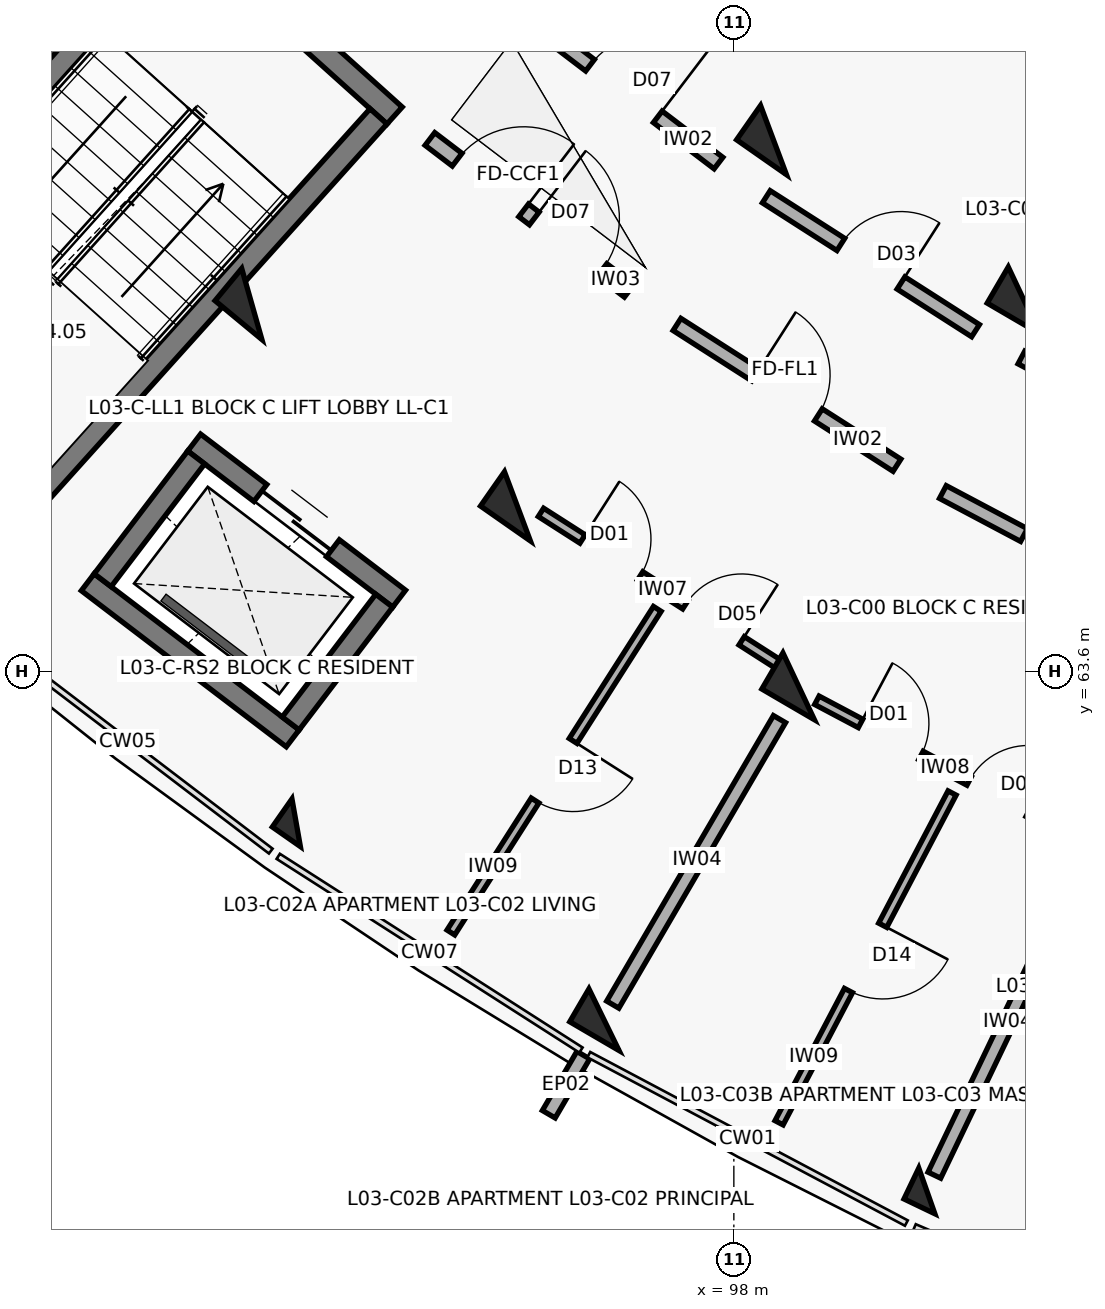
"""IFC4 building model, lengths in metres.
Left out: names, types, materials, properties, quantities, classifications, styles, units other than length and angle.
Written with IfcOpenShell. Run it as: python <this file> out.ifc"""

import sys

from ifc_helpers import new_model, si_unit, direction, frame, frame_2d, origin, origin_2d, place, context, subcontext, project, spatial, rectangle, extrude, element, fill, save


model = new_model("IFC4")
c1 = context("Model", 3, precision=1e-05, world=origin(), true_north=direction((0.0, 1.0)))
c2 = subcontext(c1, "Body", "Model", "MODEL_VIEW")
j1 = project(units=[si_unit("LENGTHUNIT", "METRE"), si_unit("PLANEANGLEUNIT", "RADIAN")], contexts=[c1])
p1 = place(None, origin())
s1 = spatial("IfcSite", under=j1, at=p1, CompositionType="ELEMENT")
p2 = place(p1, origin())
s2 = spatial("IfcBuilding", under=s1, at=p2, CompositionType="ELEMENT")
p3 = place(p2, frame((0.0, 0.0, 11.2)))
s3 = spatial("IfcBuildingStorey", under=s2, at=p3, CompositionType="ELEMENT", Elevation=11.2)
for number, where, z_axis, x_axis in (
    (1, (91.658, 68.43, 0.0), (0.0, 0.0, 1.0), (-0.638, -0.77, 0.0)),
    (2, (98.522, 70.587, 0.0), (0.0, 0.0, 1.0), (-0.573, -0.82, 0.0)),
    (3, (95.152, 65.768, 0.0), (0.0, 0.0, 1.0), (-0.573, -0.82, 0.0)),
):
    element("IfcColumn", number, at=place(p3, frame(where, z_axis=z_axis, x_axis=x_axis)), inside=s3, PredefinedType="COLUMN", context=c2, shape_type="SweptSolid", body=[
        extrude(rectangle(XDim=0.55, YDim=0.8, at=origin_2d()), origin(), (0.0, 0.0, 1.0), 3.1),
    ])
p4 = place(p3, frame((92.241, 61.605, 0.0), z_axis=(0.0, 0.0, 1.0), x_axis=(-0.573004420611, -0.819552276527, 0.0)))
e4 = element("IfcColumn", 4, at=p4, inside=s3, PredefinedType="COLUMN", context=c2, shape_type="SweptSolid", body=[
    extrude(rectangle(XDim=0.45, YDim=0.45, at=origin_2d()), origin(), (0.0, 0.0, 1.0), 3.1),
])
for number, where, z_axis, x_axis in (
    (5, (101.817, 68.478, 0.0), (0.0, 0.0, 1.0), (-0.504, -0.864, 0.0)),
    (6, (98.853, 63.4, 0.0), (0.0, 0.0, 1.0), (-0.504, -0.864, 0.0)),
):
    element("IfcColumn", number, at=place(p3, frame(where, z_axis=z_axis, x_axis=x_axis)), inside=s3, PredefinedType="COLUMN", context=c2, shape_type="SweptSolid", body=[
        extrude(rectangle(XDim=0.55, YDim=0.8, at=origin_2d()), origin(), (0.0, 0.0, 1.0), 3.1),
    ])
p5 = place(p3, frame((96.291, 59.013, 0.0), z_axis=(0.0, 0.0, 1.0), x_axis=(-0.504226211181, -0.863571611366, 0.0)))
e7 = element("IfcColumn", 7, at=p5, inside=s3, PredefinedType="COLUMN", context=c2, shape_type="SweptSolid", body=[
    extrude(rectangle(XDim=0.5, YDim=0.75, at=origin_2d()), origin(), (0.0, 0.0, 1.0), 3.1),
])
p6 = place(p3, frame((100.539, 56.76, 0.0), z_axis=(0.0, 0.0, 1.0), x_axis=(-0.432085748802, -0.901832526405, 0.0)))
e8 = element("IfcColumn", 8, at=p6, inside=s3, PredefinedType="COLUMN", context=c2, shape_type="SweptSolid", body=[
    extrude(rectangle(XDim=0.45, YDim=0.45, at=origin_2d()), origin(), (0.0, 0.0, 1.0), 3.1),
])
p7 = place(p3, frame((96.019, 58.547, 0.0), z_axis=(0.0, 0.0, 1.0), x_axis=(-0.504005947934, -0.863700182035, 0.0)))
e9 = element("IfcWall", 9, at=p7, inside=s3, PredefinedType="PARAPET", context=c2, shape_type="SweptSolid", body=[
    extrude(rectangle(XDim=0.9, YDim=0.195, at=frame_2d((0.45, 0.0))), origin(), (0.0, 0.0, 1.0), 2.25),
])
p8 = place(p3, frame((90.66, 73.499, 0.0), z_axis=(0.0, 0.0, 1.0), x_axis=(0.743375696158, -0.668874109501, 0.0)))
e10 = element("IfcWall", 10, at=p8, inside=s3, PredefinedType="SHEAR", context=c2, shape_type="SweptSolid", body=[
    extrude(rectangle(XDim=3.87, YDim=0.3, at=frame_2d((1.935, 0.0))), origin(), (0.0, 0.0, 1.0), 3.1),
])
p9 = place(p8, frame((1.435, 0.0, 0.0)))
e11 = element("IfcOpeningElement", 11, at=p9, cuts=e10, PredefinedType="OPENING", context=c2, shape_type="SweptSolid", body=[
    extrude(rectangle(XDim=1.0, YDim=2.15, at=frame_2d((0.5, 1.075))), frame((0.0, 0.16, 0.0), z_axis=(0.0, -1.0, 0.0), x_axis=(1.0, 0.0, 0.0)), (0.0, 0.0, 1.0), 0.32),
])
p10 = place(p3, frame((90.671, 73.287, 0.0), z_axis=(0.0, 0.0, 1.0), x_axis=(-0.668885797871, -0.743365179038, 0.0)))
e12 = element("IfcWall", 12, at=p10, inside=s3, PredefinedType="SHEAR", context=c2, shape_type="SweptSolid", body=[
    extrude(rectangle(XDim=7.69, YDim=0.3, at=frame_2d((3.845, 0.0))), origin(), (0.0, 0.0, 1.0), 3.1),
])
p11 = place(p3, frame((93.325, 70.899, 0.0), z_axis=(0.0, 0.0, 1.0), x_axis=(-0.668868253964, -0.743380964808, 0.0)))
e13 = element("IfcWall", 13, at=p11, inside=s3, PredefinedType="SHEAR", context=c2, shape_type="SweptSolid", body=[
    extrude(rectangle(XDim=7.69, YDim=0.3, at=frame_2d((3.845, 0.0))), origin(), (0.0, 0.0, 1.0), 3.1),
])
p12 = place(p3, frame((90.899, 66.607, 0.0), z_axis=(0.0, 0.0, 1.0), x_axis=(0.795439986025, -0.606032365994, 0.0)))
e14 = element("IfcWall", 14, at=p12, inside=s3, PredefinedType="SHEAR", context=c2, shape_type="SweptSolid", body=[
    extrude(rectangle(XDim=3.39, YDim=0.28, at=frame_2d((1.695, 0.0))), origin(), (0.0, 0.0, 1.0), 3.1),
])
p13 = place(p12, frame((1.095, 0.0, 0.0)))
e15 = element("IfcOpeningElement", 15, at=p13, cuts=e14, PredefinedType="OPENING", context=c2, shape_type="SweptSolid", body=[
    extrude(rectangle(XDim=1.2, YDim=2.15, at=frame_2d((0.6, 1.075))), frame((0.0, 0.15, 0.0), z_axis=(0.0, -1.0, 0.0), x_axis=(1.0, 0.0, 0.0)), (0.0, 0.0, 1.0), 0.3),
])
p14 = place(p3, frame((89.5, 64.77, 0.0), z_axis=(0.0, 0.0, 1.0), x_axis=(0.795474703455, -0.605986795371, 0.0)))
e16 = element("IfcWall", 16, at=p14, inside=s3, PredefinedType="SHEAR", context=c2, shape_type="SweptSolid", body=[
    extrude(rectangle(XDim=3.39, YDim=0.28, at=frame_2d((1.695, 0.0))), origin(), (0.0, 0.0, 1.0), 3.1),
])
p15 = place(p3, frame((90.926, 66.411, 0.0), z_axis=(0.0, 0.0, 1.0), x_axis=(-0.605948992168, -0.795503500238, 0.0)))
e17 = element("IfcWall", 17, at=p15, inside=s3, PredefinedType="SHEAR", context=c2, shape_type="SweptSolid", body=[
    extrude(rectangle(XDim=2.03, YDim=0.28, at=frame_2d((1.015, 0.0))), origin(), (0.0, 0.0, 1.0), 3.1),
])
p16 = place(p3, frame((93.4, 64.526, 0.0), z_axis=(0.0, 0.0, 1.0), x_axis=(-0.605891019062, -0.795547656033, 0.0)))
e18 = element("IfcWall", 18, at=p16, inside=s3, PredefinedType="SHEAR", context=c2, shape_type="SweptSolid", body=[
    extrude(rectangle(XDim=2.03, YDim=0.28, at=frame_2d((1.015, 0.0))), origin(), (0.0, 0.0, 1.0), 3.1),
])
p17 = place(p3, frame((94.001, 70.602, 0.0), z_axis=(0.0, 0.0, 1.0), x_axis=(0.795498026433, -0.605956178235, 0.0)))
e19 = element("IfcWall", 19, at=p17, inside=s3, PredefinedType="SOLIDWALL", context=c2, shape_type="SweptSolid", body=[
    extrude(rectangle(XDim=3.296, YDim=0.21, at=frame_2d((1.648, 0.0))), origin(), (0.0, 0.0, 1.0), 2.08),
])
p18 = place(p17, frame((0.45, 0.0, 0.0)))
e20 = element("IfcOpeningElement", 20, at=p18, cuts=e19, PredefinedType="OPENING", context=c2, shape_type="SweptSolid", body=[
    extrude(rectangle(XDim=1.1, YDim=2.15, at=frame_2d((0.55, 1.075))), frame((0.0, 0.115, 0.0), z_axis=(0.0, -1.0, 0.0), x_axis=(1.0, 0.0, 0.0)), (0.0, 0.0, 1.0), 0.23),
])
p19 = place(p17, frame((1.726, 0.0, 0.0)))
e21 = element("IfcOpeningElement", 21, at=p19, cuts=e19, PredefinedType="OPENING", context=c2, shape_type="SweptSolid", body=[
    extrude(rectangle(XDim=1.12, YDim=2.15, at=frame_2d((0.56, 1.075))), frame((0.0, 0.115, 0.0), z_axis=(0.0, -1.0, 0.0), x_axis=(1.0, 0.0, 0.0)), (0.0, 0.0, 1.0), 0.23),
])
p20 = place(p3, frame((95.309, 72.18, 0.0), z_axis=(0.0, 0.0, 1.0), x_axis=(0.795463961918, -0.606000895453, 0.0)))
e22 = element("IfcWall", 22, at=p20, inside=s3, PredefinedType="SOLIDWALL", context=c2, shape_type="SweptSolid", body=[
    extrude(rectangle(XDim=3.129, YDim=0.19, at=frame_2d((1.564, 0.0))), origin(), (0.0, 0.0, 1.0), 2.08),
])
p21 = place(p20, frame((1.004, 0.0, 0.0)))
e23 = element("IfcOpeningElement", 23, at=p21, cuts=e22, PredefinedType="OPENING", context=c2, shape_type="SweptSolid", body=[
    extrude(rectangle(XDim=1.12, YDim=2.15, at=frame_2d((0.56, 1.075))), frame((0.0, 0.105, 0.0), z_axis=(0.0, -1.0, 0.0), x_axis=(1.0, 0.0, 0.0)), (0.0, 0.0, 1.0), 0.21),
])
p22 = place(p3, frame((97.252, 68.161, 0.0), z_axis=(0.0, 0.0, 1.0), x_axis=(0.842289466461, -0.53902546757, 0.0)))
e24 = element("IfcWall", 24, at=p22, inside=s3, PredefinedType="SOLIDWALL", context=c2, shape_type="SweptSolid", body=[
    extrude(rectangle(XDim=3.436, YDim=0.19, at=frame_2d((1.718, 0.0))), origin(), (0.0, 0.0, 1.0), 2.08),
])
p23 = place(p22, frame((1.228, 0.0, 0.0)))
e25 = element("IfcOpeningElement", 25, at=p23, cuts=e24, PredefinedType="OPENING", context=c2, shape_type="SweptSolid", body=[
    extrude(rectangle(XDim=0.98, YDim=2.15, at=frame_2d((0.49, 1.075))), frame((0.0, 0.105, 0.0), z_axis=(0.0, -1.0, 0.0), x_axis=(1.0, 0.0, 0.0)), (0.0, 0.0, 1.0), 0.21),
])
p24 = place(p3, frame((98.427, 69.841, 0.0), z_axis=(0.0, 0.0, 1.0), x_axis=(0.842280895761, -0.539038860043, 0.0)))
e26 = element("IfcWall", 26, at=p24, inside=s3, PredefinedType="SOLIDWALL", context=c2, shape_type="SweptSolid", body=[
    extrude(rectangle(XDim=3.269, YDim=0.19, at=frame_2d((1.634, 0.0))), origin(), (0.0, 0.0, 1.0), 2.08),
])
p25 = place(p24, frame((1.164, 0.0, 0.0)))
e27 = element("IfcOpeningElement", 27, at=p25, cuts=e26, PredefinedType="OPENING", context=c2, shape_type="SweptSolid", body=[
    extrude(rectangle(XDim=0.94, YDim=2.1, at=frame_2d((0.47, 1.05))), frame((0.0, 0.105, 0.0), z_axis=(0.0, -1.0, 0.0), x_axis=(1.0, 0.0, 0.0)), (0.0, 0.0, 1.0), 0.21),
])
p26 = place(p3, frame((95.462, 65.688, 0.0), z_axis=(0.0, 0.0, 1.0), x_axis=(0.842274914974, -0.539048205271, 0.0)))
e28 = element("IfcWall", 28, at=p26, inside=s3, PredefinedType="PARTITIONING", context=c2, shape_type="SweptSolid", body=[
    extrude(rectangle(XDim=3.785, YDim=0.13, at=frame_2d((1.893, 0.0))), origin(), (0.0, 0.0, 1.0), 2.08),
])
p27 = place(p26, frame((0.65, 0.0, 0.0)))
e29 = element("IfcOpeningElement", 29, at=p27, cuts=e28, PredefinedType="OPENING", context=c2, shape_type="SweptSolid", body=[
    extrude(rectangle(XDim=0.9, YDim=2.1, at=frame_2d((0.45, 1.05))), frame((0.0, 0.075, 0.0), z_axis=(0.0, -1.0, 0.0), x_axis=(1.0, 0.0, 0.0)), (0.0, 0.0, 1.0), 0.15),
])
p28 = place(p26, frame((2.255, 0.0, 0.0)))
e30 = element("IfcOpeningElement", 30, at=p28, cuts=e28, PredefinedType="OPENING", context=c2, shape_type="SweptSolid", body=[
    extrude(rectangle(XDim=0.88, YDim=2.1, at=frame_2d((0.44, 1.05))), frame((0.0, 0.075, 0.0), z_axis=(0.0, -1.0, 0.0), x_axis=(1.0, 0.0, 0.0)), (0.0, 0.0, 1.0), 0.15),
])
p29 = place(p3, frame((96.993, 64.418, 0.0), z_axis=(0.0, 0.0, 1.0), x_axis=(-0.537785480308, -0.843081714409, 0.0)))
e31 = element("IfcWall", 31, at=p29, inside=s3, PredefinedType="PARTITIONING", context=c2, shape_type="SweptSolid", body=[
    extrude(rectangle(XDim=5.05, YDim=0.12, at=frame_2d((2.525, 0.0))), origin(), (0.0, 0.0, 1.0), 2.08),
])
p30 = place(p29, frame((2.06, 0.0, 0.0)))
e32 = element("IfcOpeningElement", 32, at=p30, cuts=e31, PredefinedType="OPENING", context=c2, shape_type="SweptSolid", body=[
    extrude(rectangle(XDim=0.93, YDim=2.1, at=frame_2d((0.465, 1.05))), frame((0.0, 0.07, 0.0), z_axis=(0.0, -1.0, 0.0), x_axis=(1.0, 0.0, 0.0)), (0.0, 0.0, 1.0), 0.14),
])
p31 = place(p3, frame((100.75, 65.956, 0.0), z_axis=(0.0, 0.0, 1.0), x_axis=(0.883440266101, -0.468543803963, 0.0)))
e33 = element("IfcWall", 33, at=p31, inside=s3, PredefinedType="SOLIDWALL", context=c2, shape_type="SweptSolid", body=[
    extrude(rectangle(XDim=3.436, YDim=0.19, at=frame_2d((1.718, 0.0))), origin(), (0.0, 0.0, 1.0), 2.08),
])
p32 = place(p31, frame((1.208, 0.0, 0.0)))
e34 = element("IfcOpeningElement", 34, at=p32, cuts=e33, PredefinedType="OPENING", context=c2, shape_type="SweptSolid", body=[
    extrude(rectangle(XDim=1.02, YDim=2.15, at=frame_2d((0.51, 1.075))), frame((0.0, 0.105, 0.0), z_axis=(0.0, -1.0, 0.0), x_axis=(1.0, 0.0, 0.0)), (0.0, 0.0, 1.0), 0.21),
])
p33 = place(p3, frame((101.784, 67.726, 0.0), z_axis=(0.0, 0.0, 1.0), x_axis=(0.883444301944, -0.468536194293, 0.0)))
e35 = element("IfcWall", 35, at=p33, inside=s3, PredefinedType="SOLIDWALL", context=c2, shape_type="SweptSolid", body=[
    extrude(rectangle(XDim=3.269, YDim=0.19, at=frame_2d((1.634, 0.0))), origin(), (0.0, 0.0, 1.0), 2.08),
])
p34 = place(p33, frame((1.154, 0.0, 0.0)))
e36 = element("IfcOpeningElement", 36, at=p34, cuts=e35, PredefinedType="OPENING", context=c2, shape_type="SweptSolid", body=[
    extrude(rectangle(XDim=0.96, YDim=2.1, at=frame_2d((0.48, 1.05))), frame((0.0, 0.105, 0.0), z_axis=(0.0, -1.0, 0.0), x_axis=(1.0, 0.0, 0.0)), (0.0, 0.0, 1.0), 0.21),
])
p35 = place(p3, frame((99.093, 63.216, 0.0), z_axis=(0.0, 0.0, 1.0), x_axis=(0.883432667361, -0.468558131121, 0.0)))
e37 = element("IfcWall", 37, at=p35, inside=s3, PredefinedType="PARTITIONING", context=c2, shape_type="SweptSolid", body=[
    extrude(rectangle(XDim=3.797, YDim=0.125, at=frame_2d((1.899, 0.0))), origin(), (0.0, 0.0, 1.0), 2.08),
])
p36 = place(p35, frame((0.65, 0.0, 0.0)))
e38 = element("IfcOpeningElement", 38, at=p36, cuts=e37, PredefinedType="OPENING", context=c2, shape_type="SweptSolid", body=[
    extrude(rectangle(XDim=0.9, YDim=2.1, at=frame_2d((0.45, 1.05))), frame((0.0, 0.073, 0.0), z_axis=(0.0, -1.0, 0.0), x_axis=(1.0, 0.0, 0.0)), (0.0, 0.0, 1.0), 0.145),
])
p37 = place(p35, frame((2.267, 0.0, 0.0)))
e39 = element("IfcOpeningElement", 39, at=p37, cuts=e37, PredefinedType="OPENING", context=c2, shape_type="SweptSolid", body=[
    extrude(rectangle(XDim=0.88, YDim=2.1, at=frame_2d((0.44, 1.05))), frame((0.0, 0.073, 0.0), z_axis=(0.0, -1.0, 0.0), x_axis=(1.0, 0.0, 0.0)), (0.0, 0.0, 1.0), 0.145),
])
p38 = place(p3, frame((100.871, 61.996, 0.0), z_axis=(0.0, 0.0, 1.0), x_axis=(-0.464567298878, -0.885537816704, 0.0)))
e40 = element("IfcWall", 40, at=p38, inside=s3, PredefinedType="PARTITIONING", context=c2, shape_type="SweptSolid", body=[
    extrude(rectangle(XDim=4.9, YDim=0.12, at=frame_2d((2.45, 0.0))), origin(), (0.0, 0.0, 1.0), 2.08),
])
p39 = place(p38, frame((1.965, 0.0, 0.0)))
e41 = element("IfcOpeningElement", 41, at=p39, cuts=e40, PredefinedType="OPENING", context=c2, shape_type="SweptSolid", body=[
    extrude(rectangle(XDim=0.97, YDim=2.1, at=frame_2d((0.485, 1.05))), frame((0.0, 0.07, 0.0), z_axis=(0.0, -1.0, 0.0), x_axis=(1.0, 0.0, 0.0)), (0.0, 0.0, 1.0), 0.14),
])
p40 = place(p3, frame((98.601, 62.968, 0.0), z_axis=(0.0, 0.0, 1.0), x_axis=(-0.504216452091, -0.863577309475, 0.0)))
e42 = element("IfcWall", 42, at=p40, inside=s3, PredefinedType="SOLIDWALL", context=c2, shape_type="SweptSolid", body=[
    extrude(rectangle(XDim=4.35, YDim=0.185, at=frame_2d((2.175, 0.0))), origin(), (0.0, 0.0, 1.0), 2.08),
])
p41 = place(p3, frame((102.518, 60.89, 0.0), z_axis=(0.0, 0.0, 1.0), x_axis=(-0.432108769108, -0.901821496561, 0.0)))
e43 = element("IfcWall", 43, at=p41, inside=s3, PredefinedType="SOLIDWALL", context=c2, shape_type="SweptSolid", body=[
    extrude(rectangle(XDim=4.35, YDim=0.185, at=frame_2d((2.175, 0.0))), origin(), (0.0, 0.0, 1.0), 2.08),
])
p42 = place(p13, origin())
e44 = element("IfcDoor", 44, at=p42, inside=s3, OperationType="DOUBLE_DOOR_SLIDING", PredefinedType="DOOR", context=c2, shape_type="SweptSolid", body=[
    extrude(rectangle(XDim=1.2, YDim=2.15, at=frame_2d((0.6, 1.075))), frame((0.0, 0.025, 0.0), z_axis=(0.0, -1.0, 0.0), x_axis=(1.0, 0.0, 0.0)), (0.0, 0.0, 1.0), 0.05),
])
fill(e15, e44)
p43 = place(p18, origin())
e45 = element("IfcDoor", 45, at=p43, inside=s3, OperationType="SINGLE_SWING_RIGHT", PredefinedType="DOOR", context=c2, shape_type="SweptSolid", body=[
    extrude(rectangle(XDim=1.1, YDim=2.15, at=frame_2d((0.55, 1.075))), frame((0.0, 0.025, 0.0), z_axis=(0.0, -1.0, 0.0), x_axis=(1.0, 0.0, 0.0)), (0.0, 0.0, 1.0), 0.05),
])
fill(e20, e45)
p44 = place(p19, origin())
e46 = element("IfcDoor", 46, at=p44, inside=s3, OperationType="SINGLE_SWING_LEFT", PredefinedType="DOOR", context=c2, shape_type="SweptSolid", body=[
    extrude(rectangle(XDim=1.12, YDim=2.15, at=frame_2d((0.56, 1.075))), frame((0.0, 0.025, 0.0), z_axis=(0.0, -1.0, 0.0), x_axis=(1.0, 0.0, 0.0)), (0.0, 0.0, 1.0), 0.05),
])
fill(e21, e46)
p45 = place(p21, origin())
e47 = element("IfcDoor", 47, at=p45, inside=s3, OperationType="SINGLE_SWING_RIGHT", PredefinedType="DOOR", context=c2, shape_type="SweptSolid", body=[
    extrude(rectangle(XDim=1.12, YDim=2.15, at=frame_2d((0.56, 1.075))), frame((0.0, 0.025, 0.0), z_axis=(0.0, -1.0, 0.0), x_axis=(1.0, 0.0, 0.0)), (0.0, 0.0, 1.0), 0.05),
])
fill(e23, e47)
p46 = place(p23, origin())
e48 = element("IfcDoor", 48, at=p46, inside=s3, OperationType="SINGLE_SWING_LEFT", PredefinedType="DOOR", context=c2, shape_type="SweptSolid", body=[
    extrude(rectangle(XDim=0.98, YDim=2.15, at=frame_2d((0.49, 1.075))), frame((0.0, 0.025, 0.0), z_axis=(0.0, -1.0, 0.0), x_axis=(1.0, 0.0, 0.0)), (0.0, 0.0, 1.0), 0.05),
])
fill(e25, e48)
p47 = place(p25, origin())
e49 = element("IfcDoor", 49, at=p47, inside=s3, OperationType="SINGLE_SWING_RIGHT", PredefinedType="DOOR", context=c2, shape_type="SweptSolid", body=[
    extrude(rectangle(XDim=0.94, YDim=2.1, at=frame_2d((0.47, 1.05))), frame((0.0, 0.025, 0.0), z_axis=(0.0, -1.0, 0.0), x_axis=(1.0, 0.0, 0.0)), (0.0, 0.0, 1.0), 0.05),
])
fill(e27, e49)
p48 = place(p27, origin())
e50 = element("IfcDoor", 50, at=p48, inside=s3, OperationType="SINGLE_SWING_LEFT", PredefinedType="DOOR", context=c2, shape_type="SweptSolid", body=[
    extrude(rectangle(XDim=0.9, YDim=2.1, at=frame_2d((0.45, 1.05))), frame((0.0, 0.025, 0.0), z_axis=(0.0, -1.0, 0.0), x_axis=(1.0, 0.0, 0.0)), (0.0, 0.0, 1.0), 0.05),
])
fill(e29, e50)
p49 = place(p28, origin())
e51 = element("IfcDoor", 51, at=p49, inside=s3, OperationType="SINGLE_SWING_RIGHT", PredefinedType="DOOR", context=c2, shape_type="SweptSolid", body=[
    extrude(rectangle(XDim=0.88, YDim=2.1, at=frame_2d((0.44, 1.05))), frame((0.0, 0.025, 0.0), z_axis=(0.0, -1.0, 0.0), x_axis=(1.0, 0.0, 0.0)), (0.0, 0.0, 1.0), 0.05),
])
fill(e30, e51)
p50 = place(p30, origin())
e52 = element("IfcDoor", 52, at=p50, inside=s3, OperationType="SINGLE_SWING_LEFT", PredefinedType="DOOR", context=c2, shape_type="SweptSolid", body=[
    extrude(rectangle(XDim=0.93, YDim=2.1, at=frame_2d((0.465, 1.05))), frame((0.0, 0.025, 0.0), z_axis=(0.0, -1.0, 0.0), x_axis=(1.0, 0.0, 0.0)), (0.0, 0.0, 1.0), 0.05),
])
fill(e32, e52)
p51 = place(p32, origin())
e53 = element("IfcDoor", 53, at=p51, inside=s3, OperationType="SINGLE_SWING_RIGHT", PredefinedType="DOOR", context=c2, shape_type="SweptSolid", body=[
    extrude(rectangle(XDim=1.02, YDim=2.15, at=frame_2d((0.51, 1.075))), frame((0.0, 0.025, 0.0), z_axis=(0.0, -1.0, 0.0), x_axis=(1.0, 0.0, 0.0)), (0.0, 0.0, 1.0), 0.05),
])
fill(e34, e53)
p52 = place(p36, origin())
e54 = element("IfcDoor", 54, at=p52, inside=s3, OperationType="SINGLE_SWING_LEFT", PredefinedType="DOOR", context=c2, shape_type="SweptSolid", body=[
    extrude(rectangle(XDim=0.9, YDim=2.1, at=frame_2d((0.45, 1.05))), frame((0.0, 0.025, 0.0), z_axis=(0.0, -1.0, 0.0), x_axis=(1.0, 0.0, 0.0)), (0.0, 0.0, 1.0), 0.05),
])
fill(e38, e54)
p53 = place(p37, origin())
e55 = element("IfcDoor", 55, at=p53, inside=s3, OperationType="SINGLE_SWING_RIGHT", PredefinedType="DOOR", context=c2, shape_type="SweptSolid", body=[
    extrude(rectangle(XDim=0.88, YDim=2.1, at=frame_2d((0.44, 1.05))), frame((0.0, 0.025, 0.0), z_axis=(0.0, -1.0, 0.0), x_axis=(1.0, 0.0, 0.0)), (0.0, 0.0, 1.0), 0.05),
])
fill(e39, e55)
p54 = place(p39, origin())
e56 = element("IfcDoor", 56, at=p54, inside=s3, OperationType="SINGLE_SWING_LEFT", PredefinedType="DOOR", context=c2, shape_type="SweptSolid", body=[
    extrude(rectangle(XDim=0.97, YDim=2.1, at=frame_2d((0.485, 1.05))), frame((0.0, 0.025, 0.0), z_axis=(0.0, -1.0, 0.0), x_axis=(1.0, 0.0, 0.0)), (0.0, 0.0, 1.0), 0.05),
])
fill(e41, e56)
save(model, sys.argv[1])
